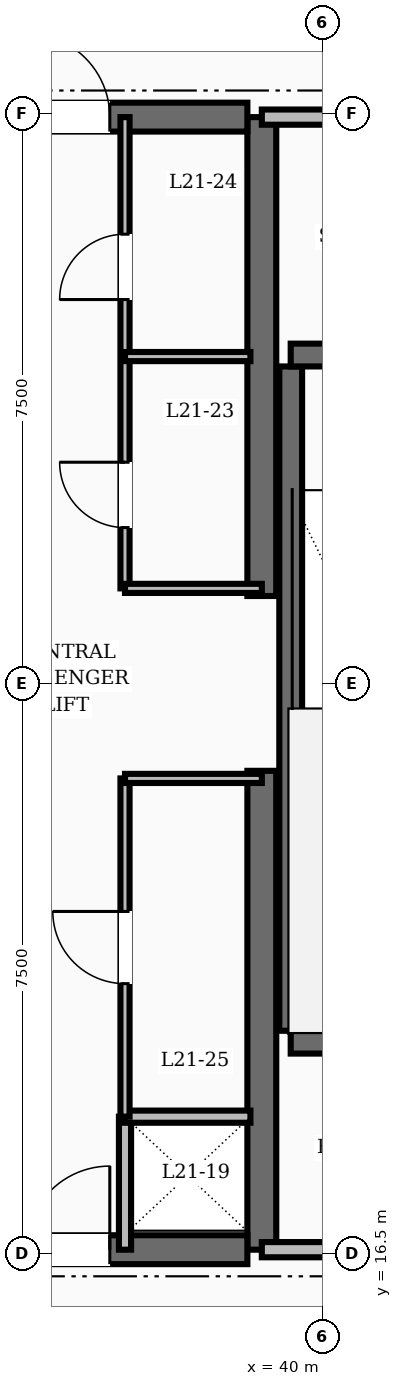
"""IFC4 building model, lengths in metres.
Left out: names, types, materials, properties, quantities, classifications, styles, units other than length and angle.
Written with IfcOpenShell. Run it as: python <this file> out.ifc"""

import sys

from ifc_helpers import new_model, si_unit, direction, frame, frame_2d, origin, place, context, subcontext, project, spatial, rectangle, extrude, element, fill, save


model = new_model("IFC4")
c1 = context("Model", 3, precision=1e-05, world=origin(), true_north=direction((0.0, 1.0)))
c2 = subcontext(c1, "Body", "Model", "MODEL_VIEW")
j1 = project(units=[si_unit("LENGTHUNIT", "METRE"), si_unit("PLANEANGLEUNIT", "RADIAN")], contexts=[c1])
p1 = place(None, origin())
s1 = spatial("IfcSite", under=j1, at=p1, CompositionType="ELEMENT")
p2 = place(p1, origin())
s2 = spatial("IfcBuilding", under=s1, at=p2, CompositionType="ELEMENT")
p3 = place(p2, frame((0.0, 0.0, 84.4)))
s3 = spatial("IfcBuildingStorey", under=s2, at=p3, CompositionType="ELEMENT", Elevation=84.4)
for number, where, z_axis, x_axis in (
    (1, (39.2, 16.55, 0.0), (0.0, 0.0, 1.0), (0.0, 1.0, 0.0)),
    (2, (39.2, 25.15, 0.0), (0.0, 0.0, 1.0), (0.0, 1.0, 0.0)),
):
    element("IfcWall", number, at=place(p3, frame(where, z_axis=z_axis, x_axis=x_axis)), inside=s3, PredefinedType="SHEAR", context=c2, shape_type="SweptSolid", body=[
        extrude(rectangle(XDim=6.3, YDim=0.38, at=frame_2d((3.15, 0.0))), origin(), (0.0, 0.0, 1.0), 3.6),
    ])
p4 = place(p3, frame((35.8, 16.55, 0.0), z_axis=(0.0, 0.0, 1.0), x_axis=(1.0, 0.0, 0.0)))
e3 = element("IfcWall", 3, at=p4, inside=s3, PredefinedType="SHEAR", context=c2, shape_type="SweptSolid", body=[
    extrude(rectangle(XDim=3.21, YDim=0.38, at=frame_2d((1.605, 0.0))), origin(), (0.0, 0.0, 1.0), 3.6),
])
p5 = place(p4, frame((0.3, 0.0, 0.0)))
e4 = element("IfcOpeningElement", 4, at=p5, cuts=e3, PredefinedType="OPENING", context=c2, shape_type="SweptSolid", body=[
    extrude(rectangle(XDim=1.1, YDim=2.1, at=frame_2d((0.55, 1.05))), frame((0.0, 0.2, 0.0), z_axis=(0.0, -1.0, 0.0), x_axis=(1.0, 0.0, 0.0)), (0.0, 0.0, 1.0), 0.4),
])
p6 = place(p3, frame((35.8, 31.45, 0.0), z_axis=(0.0, 0.0, 1.0), x_axis=(1.0, 0.0, 0.0)))
e5 = element("IfcWall", 5, at=p6, inside=s3, PredefinedType="SHEAR", context=c2, shape_type="SweptSolid", body=[
    extrude(rectangle(XDim=3.21, YDim=0.38, at=frame_2d((1.605, 0.0))), origin(), (0.0, 0.0, 1.0), 3.6),
])
p7 = place(p6, frame((0.3, 0.0, 0.0)))
e6 = element("IfcOpeningElement", 6, at=p7, cuts=e5, PredefinedType="OPENING", context=c2, shape_type="SweptSolid", body=[
    extrude(rectangle(XDim=1.1, YDim=2.1, at=frame_2d((0.55, 1.05))), frame((0.0, 0.2, 0.0), z_axis=(0.0, -1.0, 0.0), x_axis=(1.0, 0.0, 0.0)), (0.0, 0.0, 1.0), 0.4),
])
p8 = place(p3, frame((39.58, 19.43, 0.0), z_axis=(0.0, 0.0, 1.0), x_axis=(0.0, 1.0, 0.0)))
e7 = element("IfcWall", 7, at=p8, inside=s3, PredefinedType="SHEAR", context=c2, shape_type="SweptSolid", body=[
    extrude(rectangle(XDim=8.74, YDim=0.3, at=frame_2d((4.37, 0.0))), origin(), (0.0, 0.0, 1.0), 3.6),
])
p9 = place(p3, frame((39.58, 19.28, 0.0), z_axis=(0.0, 0.0, 1.0), x_axis=(1.0, 0.0, 0.0)))
e8 = element("IfcWall", 8, at=p9, inside=s3, PredefinedType="SHEAR", context=c2, shape_type="SweptSolid", body=[
    extrude(rectangle(XDim=3.6, YDim=0.3, at=frame_2d((1.8, 0.0))), origin(), (0.0, 0.0, 1.0), 3.6),
])
p10 = place(p3, frame((39.58, 28.32, 0.0), z_axis=(0.0, 0.0, 1.0), x_axis=(1.0, 0.0, 0.0)))
e9 = element("IfcWall", 9, at=p10, inside=s3, PredefinedType="SHEAR", context=c2, shape_type="SweptSolid", body=[
    extrude(rectangle(XDim=3.6, YDim=0.3, at=frame_2d((1.8, 0.0))), origin(), (0.0, 0.0, 1.0), 3.6),
])
p11 = place(p10, frame((1.3, 0.0, 0.0)))
e10 = element("IfcOpeningElement", 10, at=p11, cuts=e9, PredefinedType="OPENING", context=c2, shape_type="SweptSolid", body=[
    extrude(rectangle(XDim=1.1, YDim=2.1, at=frame_2d((0.55, 1.05))), frame((0.0, 0.16, 0.0), z_axis=(0.0, -1.0, 0.0), x_axis=(1.0, 0.0, 0.0)), (0.0, 0.0, 1.0), 0.32),
])
for number, where, z_axis, x_axis in (
    (11, (39.2, 31.45, 0.0), (0.0, 0.0, 1.0), (1.0, 0.0, 0.0)),
    (12, (39.2, 16.55, 0.0), (0.0, 0.0, 1.0), (1.0, 0.0, 0.0)),
):
    element("IfcWall", number, at=place(p3, frame(where, z_axis=z_axis, x_axis=x_axis)), inside=s3, PredefinedType="SOLIDWALL", context=c2, shape_type="SweptSolid", body=[
        extrude(rectangle(XDim=3.98, YDim=0.2, at=frame_2d((1.99, 0.0))), origin(), (0.0, 0.0, 1.0), 2.71),
    ])
p12 = place(p3, frame((37.4, 16.55, 0.0), z_axis=(0.0, 0.0, 1.0), x_axis=(0.0, 1.0, 0.0)))
e13 = element("IfcWall", 13, at=p12, inside=s3, PredefinedType="SOLIDWALL", context=c2, shape_type="SweptSolid", body=[
    extrude(rectangle(XDim=1.75, YDim=0.16, at=frame_2d((0.875, 0.0))), origin(), (0.0, 0.0, 1.0), 2.71),
])
p13 = place(p3, frame((37.4, 18.3, 0.0), z_axis=(0.0, 0.0, 1.0), x_axis=(1.0, 0.0, 0.0)))
e14 = element("IfcWall", 14, at=p13, inside=s3, PredefinedType="SOLIDWALL", context=c2, shape_type="SweptSolid", body=[
    extrude(rectangle(XDim=1.65, YDim=0.16, at=frame_2d((0.825, 0.0))), origin(), (0.0, 0.0, 1.0), 2.71),
])
p14 = place(p3, frame((37.4, 25.25, 0.0), z_axis=(0.0, 0.0, 1.0), x_axis=(0.0, 1.0, 0.0)))
e15 = element("IfcWall", 15, at=p14, inside=s3, PredefinedType="PARTITIONING", context=c2, shape_type="SweptSolid", body=[
    extrude(rectangle(XDim=6.2, YDim=0.12, at=frame_2d((3.1, 0.0))), origin(), (0.0, 0.0, 1.0), 2.71),
])
p15 = place(p14, frame((0.8, 0.0, 0.0)))
e16 = element("IfcOpeningElement", 16, at=p15, cuts=e15, PredefinedType="OPENING", context=c2, shape_type="SweptSolid", body=[
    extrude(rectangle(XDim=0.86, YDim=2.1, at=frame_2d((0.43, 1.05))), frame((0.0, 0.07, 0.0), z_axis=(0.0, -1.0, 0.0), x_axis=(1.0, 0.0, 0.0)), (0.0, 0.0, 1.0), 0.14),
])
p16 = place(p14, frame((3.8, 0.0, 0.0)))
e17 = element("IfcOpeningElement", 17, at=p16, cuts=e15, PredefinedType="OPENING", context=c2, shape_type="SweptSolid", body=[
    extrude(rectangle(XDim=0.86, YDim=2.1, at=frame_2d((0.43, 1.05))), frame((0.0, 0.07, 0.0), z_axis=(0.0, -1.0, 0.0), x_axis=(1.0, 0.0, 0.0)), (0.0, 0.0, 1.0), 0.14),
])
p17 = place(p3, frame((37.4, 25.25, 0.0), z_axis=(0.0, 0.0, 1.0), x_axis=(1.0, 0.0, 0.0)))
e18 = element("IfcWall", 18, at=p17, inside=s3, PredefinedType="PARTITIONING", context=c2, shape_type="SweptSolid", body=[
    extrude(rectangle(XDim=1.8, YDim=0.12, at=frame_2d((0.9, 0.0))), origin(), (0.0, 0.0, 1.0), 2.71),
])
p18 = place(p3, frame((37.4, 18.3, 0.0), z_axis=(0.0, 0.0, 1.0), x_axis=(0.0, 1.0, 0.0)))
e19 = element("IfcWall", 19, at=p18, inside=s3, PredefinedType="PARTITIONING", context=c2, shape_type="SweptSolid", body=[
    extrude(rectangle(XDim=4.45, YDim=0.12, at=frame_2d((2.225, 0.0))), origin(), (0.0, 0.0, 1.0), 2.71),
])
p19 = place(p18, frame((1.75, 0.0, 0.0)))
e20 = element("IfcOpeningElement", 20, at=p19, cuts=e19, PredefinedType="OPENING", context=c2, shape_type="SweptSolid", body=[
    extrude(rectangle(XDim=0.95, YDim=2.1, at=frame_2d((0.475, 1.05))), frame((0.0, 0.07, 0.0), z_axis=(0.0, -1.0, 0.0), x_axis=(1.0, 0.0, 0.0)), (0.0, 0.0, 1.0), 0.14),
])
p20 = place(p3, frame((37.4, 22.75, 0.0), z_axis=(0.0, 0.0, 1.0), x_axis=(1.0, 0.0, 0.0)))
e21 = element("IfcWall", 21, at=p20, inside=s3, PredefinedType="PARTITIONING", context=c2, shape_type="SweptSolid", body=[
    extrude(rectangle(XDim=1.8, YDim=0.12, at=frame_2d((0.9, 0.0))), origin(), (0.0, 0.0, 1.0), 2.71),
])
p21 = place(p3, frame((37.4, 28.3, 0.0), z_axis=(0.0, 0.0, 1.0), x_axis=(1.0, 0.0, 0.0)))
e22 = element("IfcWall", 22, at=p21, inside=s3, PredefinedType="PARTITIONING", context=c2, shape_type="SweptSolid", body=[
    extrude(rectangle(XDim=1.65, YDim=0.12, at=frame_2d((0.825, 0.0))), origin(), (0.0, 0.0, 1.0), 2.71),
])
p22 = place(p7, origin())
e23 = element("IfcDoor", 23, at=p22, inside=s3, OperationType="SINGLE_SWING_LEFT", PredefinedType="DOOR", context=c2, shape_type="SweptSolid", body=[
    extrude(rectangle(XDim=1.1, YDim=2.1, at=frame_2d((0.55, 1.05))), frame((0.0, 0.025, 0.0), z_axis=(0.0, -1.0, 0.0), x_axis=(1.0, 0.0, 0.0)), (0.0, 0.0, 1.0), 0.05),
])
fill(e6, e23)
p23 = place(p5, origin())
e24 = element("IfcDoor", 24, at=p23, inside=s3, OperationType="SINGLE_SWING_RIGHT", PredefinedType="DOOR", context=c2, shape_type="SweptSolid", body=[
    extrude(rectangle(XDim=1.1, YDim=2.1, at=frame_2d((0.55, 1.05))), frame((0.0, 0.025, 0.0), z_axis=(0.0, -1.0, 0.0), x_axis=(1.0, 0.0, 0.0)), (0.0, 0.0, 1.0), 0.05),
])
fill(e4, e24)
p24 = place(p15, origin())
e25 = element("IfcDoor", 25, at=p24, inside=s3, OperationType="SINGLE_SWING_RIGHT", PredefinedType="DOOR", context=c2, shape_type="SweptSolid", body=[
    extrude(rectangle(XDim=0.86, YDim=2.1, at=frame_2d((0.43, 1.05))), frame((0.0, 0.025, 0.0), z_axis=(0.0, -1.0, 0.0), x_axis=(1.0, 0.0, 0.0)), (0.0, 0.0, 1.0), 0.05),
])
fill(e16, e25)
p25 = place(p16, origin())
e26 = element("IfcDoor", 26, at=p25, inside=s3, OperationType="SINGLE_SWING_LEFT", PredefinedType="DOOR", context=c2, shape_type="SweptSolid", body=[
    extrude(rectangle(XDim=0.86, YDim=2.1, at=frame_2d((0.43, 1.05))), frame((0.0, 0.025, 0.0), z_axis=(0.0, -1.0, 0.0), x_axis=(1.0, 0.0, 0.0)), (0.0, 0.0, 1.0), 0.05),
])
fill(e17, e26)
p26 = place(p19, origin())
e27 = element("IfcDoor", 27, at=p26, inside=s3, OperationType="SINGLE_SWING_RIGHT", PredefinedType="DOOR", context=c2, shape_type="SweptSolid", body=[
    extrude(rectangle(XDim=0.95, YDim=2.1, at=frame_2d((0.475, 1.05))), frame((0.0, 0.025, 0.0), z_axis=(0.0, -1.0, 0.0), x_axis=(1.0, 0.0, 0.0)), (0.0, 0.0, 1.0), 0.05),
])
fill(e20, e27)
save(model, sys.argv[1])
